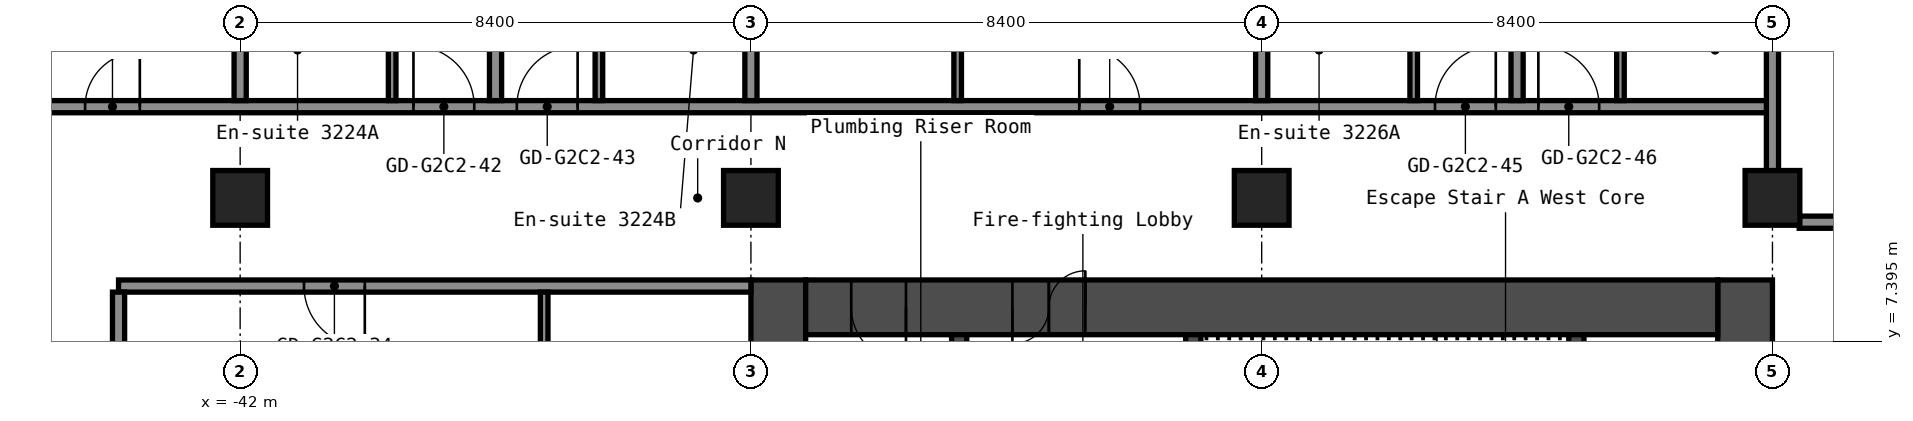
"""IFC4 building model, lengths in metres.
Left out: names, types, materials, properties, quantities, classifications, styles, units other than length and angle.
Written with IfcOpenShell. Run it as: python <this file> out.ifc"""

import sys

from ifc_helpers import new_model, si_unit, direction, frame, frame_2d, origin, origin_2d, place, context, subcontext, project, spatial, rectangle, hollow_rectangle, extrude, element, fill, save


model = new_model("IFC4")
c1 = context("Model", 3, precision=1e-05, world=origin(), true_north=direction((0.0, 1.0)))
c2 = subcontext(c1, "Body", "Model", "MODEL_VIEW")
j1 = project(units=[si_unit("LENGTHUNIT", "METRE"), si_unit("PLANEANGLEUNIT", "RADIAN")], contexts=[c1])
p1 = place(None, origin())
s1 = spatial("IfcSite", under=j1, at=p1, CompositionType="ELEMENT")
p2 = place(p1, origin())
s2 = spatial("IfcBuilding", under=s1, at=p2, CompositionType="ELEMENT")
p3 = place(p2, frame((0.0, 0.0, 113.8)))
s3 = spatial("IfcBuildingStorey", under=s2, at=p3, CompositionType="ELEMENT", Elevation=113.8)
for number, where, z_axis, x_axis in (
    (1, (-42.0, 9.75, 0.0), (0.0, 0.0, 1.0), (1.0, 0.0, 0.0)),
    (2, (-33.6, 9.75, 0.0), (0.0, 0.0, 1.0), (1.0, 0.0, 0.0)),
    (3, (-25.2, 9.75, 0.0), (0.0, 0.0, 1.0), (1.0, 0.0, 0.0)),
    (4, (-16.8, 9.75, 0.0), (0.0, 0.0, 1.0), (1.0, 0.0, 0.0)),
):
    element("IfcColumn", number, at=place(p3, frame(where, z_axis=z_axis, x_axis=x_axis)), inside=s3, PredefinedType="COLUMN", context=c2, shape_type="SweptSolid", body=[
        extrude(hollow_rectangle(XDim=0.9, YDim=0.9, WallThickness=0.036, at=origin_2d()), origin(), (0.0, 0.0, 1.0), 2.8),
    ])
p4 = place(p3, frame((-17.25, -8.4, 0.0), z_axis=(0.0, 0.0, 1.0), x_axis=(0.0, 1.0, 0.0)))
e5 = element("IfcWall", 5, at=p4, inside=s3, PredefinedType="SHEAR", context=c2, shape_type="SweptSolid", body=[
    extrude(rectangle(XDim=16.8, YDim=0.9, at=frame_2d((8.4, 0.0))), origin(), (0.0, 0.0, 1.0), 2.8),
])
p5 = place(p4, frame((7.6, 0.0, 0.0)))
e6 = element("IfcOpeningElement", 6, at=p5, cuts=e5, PredefinedType="OPENING", context=c2, shape_type="SweptSolid", body=[
    extrude(rectangle(XDim=1.2, YDim=2.1, at=frame_2d((0.6, 1.05))), frame((0.0, 0.46, 0.0), z_axis=(0.0, -1.0, 0.0), x_axis=(1.0, 0.0, 0.0)), (0.0, 0.0, 1.0), 0.92),
])
p6 = place(p3, frame((-33.15, -8.4, 0.0), z_axis=(0.0, 0.0, 1.0), x_axis=(0.0, 1.0, 0.0)))
e7 = element("IfcWall", 7, at=p6, inside=s3, PredefinedType="SHEAR", context=c2, shape_type="SweptSolid", body=[
    extrude(rectangle(XDim=16.8, YDim=0.9, at=frame_2d((8.4, 0.0))), origin(), (0.0, 0.0, 1.0), 2.8),
])
p7 = place(p3, frame((-32.7, 7.95, 0.0), z_axis=(0.0, 0.0, 1.0), x_axis=(1.0, 0.0, 0.0)))
e8 = element("IfcWall", 8, at=p7, inside=s3, PredefinedType="SHEAR", context=c2, shape_type="SweptSolid", body=[
    extrude(rectangle(XDim=15.0, YDim=0.9, at=frame_2d((7.5, 0.0))), origin(), (0.0, 0.0, 1.0), 2.8),
])
p8 = place(p7, frame((3.4, 0.0, 0.0)))
e9 = element("IfcOpeningElement", 9, at=p8, cuts=e8, PredefinedType="OPENING", context=c2, shape_type="SweptSolid", body=[
    extrude(rectangle(XDim=1.2, YDim=2.1, at=frame_2d((0.6, 1.05))), frame((0.0, 0.46, 0.0), z_axis=(0.0, -1.0, 0.0), x_axis=(1.0, 0.0, 0.0)), (0.0, 0.0, 1.0), 0.92),
])
p9 = place(p7, frame((0.75, 0.0, 0.0)))
e10 = element("IfcOpeningElement", 10, at=p9, cuts=e8, PredefinedType="OPENING", context=c2, shape_type="SweptSolid", body=[
    extrude(rectangle(XDim=0.9, YDim=2.1, at=frame_2d((0.45, 1.05))), frame((0.0, 0.46, 0.0), z_axis=(0.0, -1.0, 0.0), x_axis=(1.0, 0.0, 0.0)), (0.0, 0.0, 1.0), 0.92),
])
p10 = place(p3, frame((-20.025, 1.2, 0.0), z_axis=(0.0, 0.0, 1.0), x_axis=(0.0, 1.0, 0.0)))
e11 = element("IfcWall", 11, at=p10, inside=s3, PredefinedType="SHEAR", context=c2, shape_type="SweptSolid", body=[
    extrude(rectangle(XDim=6.3, YDim=0.25, at=frame_2d((3.15, 0.0))), origin(), (0.0, 0.0, 1.0), 2.8),
])
p11 = place(p3, frame((-26.325, 3.75, 0.0), z_axis=(0.0, 0.0, 1.0), x_axis=(0.0, 1.0, 0.0)))
e12 = element("IfcWall", 12, at=p11, inside=s3, PredefinedType="SHEAR", context=c2, shape_type="SweptSolid", body=[
    extrude(rectangle(XDim=3.75, YDim=0.25, at=frame_2d((1.875, 0.0))), origin(), (0.0, 0.0, 1.0), 2.8),
])
p12 = place(p11, frame((1.25, 0.0, 0.0)))
e13 = element("IfcOpeningElement", 13, at=p12, cuts=e12, PredefinedType="OPENING", context=c2, shape_type="SweptSolid", body=[
    extrude(rectangle(XDim=1.2, YDim=2.1, at=frame_2d((0.6, 1.05))), frame((0.0, 0.135, 0.0), z_axis=(0.0, -1.0, 0.0), x_axis=(1.0, 0.0, 0.0)), (0.0, 0.0, 1.0), 0.27),
])
p13 = place(p3, frame((-30.175, 1.45, 0.0), z_axis=(0.0, 0.0, 1.0), x_axis=(0.0, 1.0, 0.0)))
e14 = element("IfcWall", 14, at=p13, inside=s3, PredefinedType="SHEAR", context=c2, shape_type="SweptSolid", body=[
    extrude(rectangle(XDim=6.05, YDim=0.25, at=frame_2d((3.025, 0.0))), origin(), (0.0, 0.0, 1.0), 2.8),
])
p14 = place(p13, frame((2.625, 0.0, 0.0)))
e15 = element("IfcOpeningElement", 15, at=p14, cuts=e14, PredefinedType="OPENING", context=c2, shape_type="SweptSolid", body=[
    extrude(rectangle(XDim=1.1, YDim=2.1, at=frame_2d((0.55, 1.05))), frame((0.0, 0.135, 0.0), z_axis=(0.0, -1.0, 0.0), x_axis=(1.0, 0.0, 0.0)), (0.0, 0.0, 1.0), 0.27),
])
p15 = place(p3, frame((-44.0, 8.3, 0.0), z_axis=(0.0, 0.0, 1.0), x_axis=(1.0, 0.0, 0.0)))
e16 = element("IfcWall", 16, at=p15, inside=s3, PredefinedType="PARTITIONING", context=c2, shape_type="SweptSolid", body=[
    extrude(rectangle(XDim=10.4, YDim=0.2, at=frame_2d((5.2, 0.0))), origin(), (0.0, 0.0, 1.0), 2.8),
])
p16 = place(p15, frame((3.05, 0.0, 0.0)))
e17 = element("IfcOpeningElement", 17, at=p16, cuts=e16, PredefinedType="OPENING", context=c2, shape_type="SweptSolid", body=[
    extrude(rectangle(XDim=1.0, YDim=2.1, at=frame_2d((0.5, 1.05))), frame((0.0, 0.11, 0.0), z_axis=(0.0, -1.0, 0.0), x_axis=(1.0, 0.0, 0.0)), (0.0, 0.0, 1.0), 0.22),
])
p17 = place(p3, frame((-16.36, 9.35, 0.0), z_axis=(0.0, 0.0, 1.0), x_axis=(1.0, 0.0, 0.0)))
e18 = element("IfcWall", 18, at=p17, inside=s3, PredefinedType="PARTITIONING", context=c2, shape_type="SweptSolid", body=[
    extrude(rectangle(XDim=32.72, YDim=0.2, at=frame_2d((16.36, 0.0))), origin(), (0.0, 0.0, 1.0), 2.8),
])
p18 = place(p17, frame((1.56, 0.0, 0.0)))
e19 = element("IfcOpeningElement", 19, at=p18, cuts=e18, PredefinedType="OPENING", context=c2, shape_type="SweptSolid", body=[
    extrude(rectangle(XDim=1.0, YDim=2.1, at=frame_2d((0.5, 1.05))), frame((0.0, 0.11, 0.0), z_axis=(0.0, -1.0, 0.0), x_axis=(1.0, 0.0, 0.0)), (0.0, 0.0, 1.0), 0.22),
])
p19 = place(p17, frame((10.81, 0.0, 0.0)))
e20 = element("IfcOpeningElement", 20, at=p19, cuts=e18, PredefinedType="OPENING", context=c2, shape_type="SweptSolid", body=[
    extrude(rectangle(XDim=1.0, YDim=2.1, at=frame_2d((0.5, 1.05))), frame((0.0, 0.11, 0.0), z_axis=(0.0, -1.0, 0.0), x_axis=(1.0, 0.0, 0.0)), (0.0, 0.0, 1.0), 0.22),
])
p20 = place(p17, frame((12.51, 0.0, 0.0)))
e21 = element("IfcOpeningElement", 21, at=p20, cuts=e18, PredefinedType="OPENING", context=c2, shape_type="SweptSolid", body=[
    extrude(rectangle(XDim=1.0, YDim=2.1, at=frame_2d((0.5, 1.05))), frame((0.0, 0.11, 0.0), z_axis=(0.0, -1.0, 0.0), x_axis=(1.0, 0.0, 0.0)), (0.0, 0.0, 1.0), 0.22),
])
p21 = place(p17, frame((20.06, 0.0, 0.0)))
e22 = element("IfcOpeningElement", 22, at=p21, cuts=e18, PredefinedType="OPENING", context=c2, shape_type="SweptSolid", body=[
    extrude(rectangle(XDim=1.0, YDim=2.1, at=frame_2d((0.5, 1.05))), frame((0.0, 0.11, 0.0), z_axis=(0.0, -1.0, 0.0), x_axis=(1.0, 0.0, 0.0)), (0.0, 0.0, 1.0), 0.22),
])
p22 = place(p17, frame((28.46, 0.0, 0.0)))
e23 = element("IfcOpeningElement", 23, at=p22, cuts=e18, PredefinedType="OPENING", context=c2, shape_type="SweptSolid", body=[
    extrude(rectangle(XDim=1.0, YDim=2.1, at=frame_2d((0.5, 1.05))), frame((0.0, 0.11, 0.0), z_axis=(0.0, -1.0, 0.0), x_axis=(1.0, 0.0, 0.0)), (0.0, 0.0, 1.0), 0.22),
])
p23 = place(p3, frame((-46.5, 11.25, 0.0), z_axis=(0.0, 0.0, 1.0), x_axis=(1.0, 0.0, 0.0)))
e24 = element("IfcWall", 24, at=p23, inside=s3, PredefinedType="PARTITIONING", context=c2, shape_type="SweptSolid", body=[
    extrude(rectangle(XDim=29.7, YDim=0.2, at=frame_2d((14.85, 0.0))), origin(), (0.0, 0.0, 1.0), 2.8),
])
p24 = place(p23, frame((1.95, 0.0, 0.0)))
e25 = element("IfcOpeningElement", 25, at=p24, cuts=e24, PredefinedType="OPENING", context=c2, shape_type="SweptSolid", body=[
    extrude(rectangle(XDim=0.9, YDim=2.1, at=frame_2d((0.45, 1.05))), frame((0.0, 0.11, 0.0), z_axis=(0.0, -1.0, 0.0), x_axis=(1.0, 0.0, 0.0)), (0.0, 0.0, 1.0), 0.22),
])
p25 = place(p23, frame((7.35, 0.0, 0.0)))
e26 = element("IfcOpeningElement", 26, at=p25, cuts=e24, PredefinedType="OPENING", context=c2, shape_type="SweptSolid", body=[
    extrude(rectangle(XDim=1.0, YDim=2.1, at=frame_2d((0.5, 1.05))), frame((0.0, 0.11, 0.0), z_axis=(0.0, -1.0, 0.0), x_axis=(1.0, 0.0, 0.0)), (0.0, 0.0, 1.0), 0.22),
])
p26 = place(p23, frame((9.05, 0.0, 0.0)))
e27 = element("IfcOpeningElement", 27, at=p26, cuts=e24, PredefinedType="OPENING", context=c2, shape_type="SweptSolid", body=[
    extrude(rectangle(XDim=1.0, YDim=2.1, at=frame_2d((0.5, 1.05))), frame((0.0, 0.11, 0.0), z_axis=(0.0, -1.0, 0.0), x_axis=(1.0, 0.0, 0.0)), (0.0, 0.0, 1.0), 0.22),
])
p27 = place(p23, frame((18.3, 0.0, 0.0)))
e28 = element("IfcOpeningElement", 28, at=p27, cuts=e24, PredefinedType="OPENING", context=c2, shape_type="SweptSolid", body=[
    extrude(rectangle(XDim=1.0, YDim=2.1, at=frame_2d((0.5, 1.05))), frame((0.0, 0.11, 0.0), z_axis=(0.0, -1.0, 0.0), x_axis=(1.0, 0.0, 0.0)), (0.0, 0.0, 1.0), 0.22),
])
p28 = place(p23, frame((24.15, 0.0, 0.0)))
e29 = element("IfcOpeningElement", 29, at=p28, cuts=e24, PredefinedType="OPENING", context=c2, shape_type="SweptSolid", body=[
    extrude(rectangle(XDim=1.0, YDim=2.1, at=frame_2d((0.5, 1.05))), frame((0.0, 0.11, 0.0), z_axis=(0.0, -1.0, 0.0), x_axis=(1.0, 0.0, 0.0)), (0.0, 0.0, 1.0), 0.22),
])
p29 = place(p23, frame((25.85, 0.0, 0.0)))
e30 = element("IfcOpeningElement", 30, at=p29, cuts=e24, PredefinedType="OPENING", context=c2, shape_type="SweptSolid", body=[
    extrude(rectangle(XDim=1.0, YDim=2.1, at=frame_2d((0.5, 1.05))), frame((0.0, 0.11, 0.0), z_axis=(0.0, -1.0, 0.0), x_axis=(1.0, 0.0, 0.0)), (0.0, 0.0, 1.0), 0.22),
])
p30 = place(p3, frame((-44.0, -8.2, 0.0), z_axis=(0.0, 0.0, 1.0), x_axis=(0.0, 1.0, 0.0)))
e31 = element("IfcWall", 31, at=p30, inside=s3, PredefinedType="PARTITIONING", context=c2, shape_type="SweptSolid", body=[
    extrude(rectangle(XDim=16.4, YDim=0.2, at=frame_2d((8.2, 0.0))), origin(), (0.0, 0.0, 1.0), 2.8),
])
p31 = place(p3, frame((-42.0, 11.35, 0.0), z_axis=(0.0, 0.0, 1.0), x_axis=(0.0, 1.0, 0.0)))
e32 = element("IfcWall", 32, at=p31, inside=s3, PredefinedType="PARTITIONING", context=c2, shape_type="SweptSolid", body=[
    extrude(rectangle(XDim=12.2, YDim=0.2, at=frame_2d((6.1, 0.0))), origin(), (0.0, 0.0, 1.0), 2.8),
])
p32 = place(p3, frame((-39.5, 11.35, 0.0), z_axis=(0.0, 0.0, 1.0), x_axis=(0.0, 1.0, 0.0)))
e33 = element("IfcWall", 33, at=p32, inside=s3, PredefinedType="PARTITIONING", context=c2, shape_type="SweptSolid", body=[
    extrude(rectangle(XDim=2.9, YDim=0.125, at=frame_2d((1.45, 0.0))), origin(), (0.0, 0.0, 1.0), 2.8),
])
p33 = place(p32, frame((1.5, 0.0, 0.0)))
e34 = element("IfcOpeningElement", 34, at=p33, cuts=e33, PredefinedType="OPENING", context=c2, shape_type="SweptSolid", body=[
    extrude(rectangle(XDim=0.8, YDim=2.1, at=frame_2d((0.4, 1.05))), frame((0.0, 0.073, 0.0), z_axis=(0.0, -1.0, 0.0), x_axis=(1.0, 0.0, 0.0)), (0.0, 0.0, 1.0), 0.145),
])
p34 = place(p3, frame((-37.8, 11.35, 0.0), z_axis=(0.0, 0.0, 1.0), x_axis=(0.0, 1.0, 0.0)))
e35 = element("IfcWall", 35, at=p34, inside=s3, PredefinedType="PARTITIONING", context=c2, shape_type="SweptSolid", body=[
    extrude(rectangle(XDim=12.2, YDim=0.2, at=frame_2d((6.1, 0.0))), origin(), (0.0, 0.0, 1.0), 2.8),
])
p35 = place(p3, frame((-37.0, 4.9, 0.0), z_axis=(0.0, 0.0, 1.0), x_axis=(0.0, 1.0, 0.0)))
e36 = element("IfcWall", 36, at=p35, inside=s3, PredefinedType="PARTITIONING", context=c2, shape_type="SweptSolid", body=[
    extrude(rectangle(XDim=3.3, YDim=0.125, at=frame_2d((1.65, 0.0))), origin(), (0.0, 0.0, 1.0), 2.8),
])
p36 = place(p3, frame((-36.1, 11.35, 0.0), z_axis=(0.0, 0.0, 1.0), x_axis=(0.0, 1.0, 0.0)))
e37 = element("IfcWall", 37, at=p36, inside=s3, PredefinedType="PARTITIONING", context=c2, shape_type="SweptSolid", body=[
    extrude(rectangle(XDim=2.9, YDim=0.125, at=frame_2d((1.45, 0.0))), origin(), (0.0, 0.0, 1.0), 2.8),
])
p37 = place(p36, frame((1.5, 0.0, 0.0)))
e38 = element("IfcOpeningElement", 38, at=p37, cuts=e37, PredefinedType="OPENING", context=c2, shape_type="SweptSolid", body=[
    extrude(rectangle(XDim=0.8, YDim=2.1, at=frame_2d((0.4, 1.05))), frame((0.0, 0.073, 0.0), z_axis=(0.0, -1.0, 0.0), x_axis=(1.0, 0.0, 0.0)), (0.0, 0.0, 1.0), 0.145),
])
p38 = place(p3, frame((-33.6, 11.35, 0.0), z_axis=(0.0, 0.0, 1.0), x_axis=(0.0, 1.0, 0.0)))
e39 = element("IfcWall", 39, at=p38, inside=s3, PredefinedType="PARTITIONING", context=c2, shape_type="SweptSolid", body=[
    extrude(rectangle(XDim=12.2, YDim=0.2, at=frame_2d((6.1, 0.0))), origin(), (0.0, 0.0, 1.0), 2.8),
])
p39 = place(p3, frame((-30.2, 11.35, 0.0), z_axis=(0.0, 0.0, 1.0), x_axis=(0.0, 1.0, 0.0)))
e40 = element("IfcWall", 40, at=p39, inside=s3, PredefinedType="PARTITIONING", context=c2, shape_type="SweptSolid", body=[
    extrude(rectangle(XDim=3.3, YDim=0.125, at=frame_2d((1.65, 0.0))), origin(), (0.0, 0.0, 1.0), 2.8),
])
p40 = place(p3, frame((-25.2, 11.35, 0.0), z_axis=(0.0, 0.0, 1.0), x_axis=(0.0, 1.0, 0.0)))
e41 = element("IfcWall", 41, at=p40, inside=s3, PredefinedType="PARTITIONING", context=c2, shape_type="SweptSolid", body=[
    extrude(rectangle(XDim=12.2, YDim=0.2, at=frame_2d((6.1, 0.0))), origin(), (0.0, 0.0, 1.0), 2.8),
])
p41 = place(p3, frame((-22.7, 11.35, 0.0), z_axis=(0.0, 0.0, 1.0), x_axis=(0.0, 1.0, 0.0)))
e42 = element("IfcWall", 42, at=p41, inside=s3, PredefinedType="PARTITIONING", context=c2, shape_type="SweptSolid", body=[
    extrude(rectangle(XDim=2.9, YDim=0.125, at=frame_2d((1.45, 0.0))), origin(), (0.0, 0.0, 1.0), 2.8),
])
p42 = place(p41, frame((1.5, 0.0, 0.0)))
e43 = element("IfcOpeningElement", 43, at=p42, cuts=e42, PredefinedType="OPENING", context=c2, shape_type="SweptSolid", body=[
    extrude(rectangle(XDim=0.8, YDim=2.1, at=frame_2d((0.4, 1.05))), frame((0.0, 0.073, 0.0), z_axis=(0.0, -1.0, 0.0), x_axis=(1.0, 0.0, 0.0)), (0.0, 0.0, 1.0), 0.145),
])
p43 = place(p3, frame((-21.0, 11.35, 0.0), z_axis=(0.0, 0.0, 1.0), x_axis=(0.0, 1.0, 0.0)))
e44 = element("IfcWall", 44, at=p43, inside=s3, PredefinedType="PARTITIONING", context=c2, shape_type="SweptSolid", body=[
    extrude(rectangle(XDim=12.2, YDim=0.2, at=frame_2d((6.1, 0.0))), origin(), (0.0, 0.0, 1.0), 2.8),
])
p44 = place(p3, frame((-19.3, 11.35, 0.0), z_axis=(0.0, 0.0, 1.0), x_axis=(0.0, 1.0, 0.0)))
e45 = element("IfcWall", 45, at=p44, inside=s3, PredefinedType="PARTITIONING", context=c2, shape_type="SweptSolid", body=[
    extrude(rectangle(XDim=2.9, YDim=0.125, at=frame_2d((1.45, 0.0))), origin(), (0.0, 0.0, 1.0), 2.8),
])
p45 = place(p44, frame((1.5, 0.0, 0.0)))
e46 = element("IfcOpeningElement", 46, at=p45, cuts=e45, PredefinedType="OPENING", context=c2, shape_type="SweptSolid", body=[
    extrude(rectangle(XDim=0.8, YDim=2.1, at=frame_2d((0.4, 1.05))), frame((0.0, 0.073, 0.0), z_axis=(0.0, -1.0, 0.0), x_axis=(1.0, 0.0, 0.0)), (0.0, 0.0, 1.0), 0.145),
])
p46 = place(p3, frame((-16.8, 10.19, 0.0), z_axis=(0.0, 0.0, 1.0), x_axis=(0.0, 1.0, 0.0)))
e47 = element("IfcWall", 47, at=p46, inside=s3, PredefinedType="PARTITIONING", context=c2, shape_type="SweptSolid", body=[
    extrude(rectangle(XDim=13.36, YDim=0.2, at=frame_2d((6.68, 0.0))), origin(), (0.0, 0.0, 1.0), 2.8),
])
p47 = place(p8, origin())
e48 = element("IfcDoor", 48, at=p47, inside=s3, OperationType="DOUBLE_DOOR_SINGLE_SWING", PredefinedType="DOOR", context=c2, shape_type="SweptSolid", body=[
    extrude(rectangle(XDim=1.2, YDim=2.1, at=frame_2d((0.6, 1.05))), frame((0.0, 0.025, 0.0), z_axis=(0.0, -1.0, 0.0), x_axis=(1.0, 0.0, 0.0)), (0.0, 0.0, 1.0), 0.05),
])
fill(e9, e48)
p48 = place(p9, origin())
e49 = element("IfcDoor", 49, at=p48, inside=s3, OperationType="SINGLE_SWING_RIGHT", PredefinedType="DOOR", context=c2, shape_type="SweptSolid", body=[
    extrude(rectangle(XDim=0.9, YDim=2.1, at=frame_2d((0.45, 1.05))), frame((0.0, 0.025, 0.0), z_axis=(0.0, -1.0, 0.0), x_axis=(1.0, 0.0, 0.0)), (0.0, 0.0, 1.0), 0.05),
])
fill(e10, e49)
p49 = place(p16, origin())
e50 = element("IfcDoor", 50, at=p49, inside=s3, OperationType="SINGLE_SWING_RIGHT", PredefinedType="DOOR", context=c2, shape_type="SweptSolid", body=[
    extrude(rectangle(XDim=1.0, YDim=2.1, at=frame_2d((0.5, 1.05))), frame((0.0, 0.025, 0.0), z_axis=(0.0, -1.0, 0.0), x_axis=(1.0, 0.0, 0.0)), (0.0, 0.0, 1.0), 0.05),
])
fill(e17, e50)
p50 = place(p24, origin())
e51 = element("IfcDoor", 51, at=p50, inside=s3, OperationType="SINGLE_SWING_LEFT", PredefinedType="DOOR", context=c2, shape_type="SweptSolid", body=[
    extrude(rectangle(XDim=0.9, YDim=2.1, at=frame_2d((0.45, 1.05))), frame((0.0, 0.025, 0.0), z_axis=(0.0, -1.0, 0.0), x_axis=(1.0, 0.0, 0.0)), (0.0, 0.0, 1.0), 0.05),
])
fill(e25, e51)
p51 = place(p25, origin())
e52 = element("IfcDoor", 52, at=p51, inside=s3, OperationType="SINGLE_SWING_RIGHT", PredefinedType="DOOR", context=c2, shape_type="SweptSolid", body=[
    extrude(rectangle(XDim=1.0, YDim=2.1, at=frame_2d((0.5, 1.05))), frame((0.0, 0.025, 0.0), z_axis=(0.0, -1.0, 0.0), x_axis=(1.0, 0.0, 0.0)), (0.0, 0.0, 1.0), 0.05),
])
fill(e26, e52)
p52 = place(p26, origin())
e53 = element("IfcDoor", 53, at=p52, inside=s3, OperationType="SINGLE_SWING_LEFT", PredefinedType="DOOR", context=c2, shape_type="SweptSolid", body=[
    extrude(rectangle(XDim=1.0, YDim=2.1, at=frame_2d((0.5, 1.05))), frame((0.0, 0.025, 0.0), z_axis=(0.0, -1.0, 0.0), x_axis=(1.0, 0.0, 0.0)), (0.0, 0.0, 1.0), 0.05),
])
fill(e27, e53)
p53 = place(p27, origin())
e54 = element("IfcDoor", 54, at=p53, inside=s3, OperationType="SINGLE_SWING_RIGHT", PredefinedType="DOOR", context=c2, shape_type="SweptSolid", body=[
    extrude(rectangle(XDim=1.0, YDim=2.1, at=frame_2d((0.5, 1.05))), frame((0.0, 0.025, 0.0), z_axis=(0.0, -1.0, 0.0), x_axis=(1.0, 0.0, 0.0)), (0.0, 0.0, 1.0), 0.05),
])
fill(e28, e54)
p54 = place(p28, origin())
e55 = element("IfcDoor", 55, at=p54, inside=s3, OperationType="SINGLE_SWING_LEFT", PredefinedType="DOOR", context=c2, shape_type="SweptSolid", body=[
    extrude(rectangle(XDim=1.0, YDim=2.1, at=frame_2d((0.5, 1.05))), frame((0.0, 0.025, 0.0), z_axis=(0.0, -1.0, 0.0), x_axis=(1.0, 0.0, 0.0)), (0.0, 0.0, 1.0), 0.05),
])
fill(e29, e55)
p55 = place(p29, origin())
e56 = element("IfcDoor", 56, at=p55, inside=s3, OperationType="SINGLE_SWING_RIGHT", PredefinedType="DOOR", context=c2, shape_type="SweptSolid", body=[
    extrude(rectangle(XDim=1.0, YDim=2.1, at=frame_2d((0.5, 1.05))), frame((0.0, 0.025, 0.0), z_axis=(0.0, -1.0, 0.0), x_axis=(1.0, 0.0, 0.0)), (0.0, 0.0, 1.0), 0.05),
])
fill(e30, e56)
save(model, sys.argv[1])
